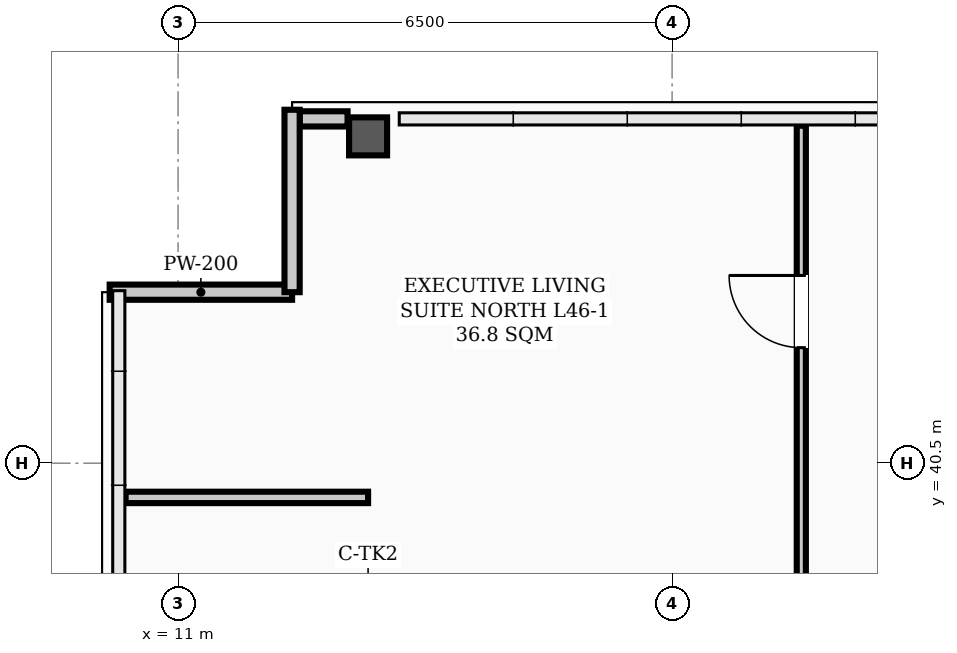
"""IFC4 building model, lengths in metres.
Left out: names, types, materials, properties, quantities, classifications, styles, units other than length and angle.
Written with IfcOpenShell. Run it as: python <this file> out.ifc"""

import sys

from ifc_helpers import new_model, si_unit, direction, frame, frame_2d, origin, origin_2d, place, context, subcontext, project, spatial, rectangle, hollow_rectangle, extrude, element, fill, save


model = new_model("IFC4")
c1 = context("Model", 3, precision=1e-05, world=origin(), true_north=direction((0.0, 1.0)))
c2 = subcontext(c1, "Body", "Model", "MODEL_VIEW")
j1 = project(units=[si_unit("LENGTHUNIT", "METRE"), si_unit("PLANEANGLEUNIT", "RADIAN")], contexts=[c1])
p1 = place(None, origin())
s1 = spatial("IfcSite", under=j1, at=p1, CompositionType="ELEMENT")
p2 = place(p1, origin())
s2 = spatial("IfcBuilding", under=s1, at=p2, CompositionType="ELEMENT")
p3 = place(p2, frame((0.0, 0.0, 185.1)))
s3 = spatial("IfcBuildingStorey", under=s2, at=p3, CompositionType="ELEMENT", Elevation=185.1)
p4 = place(p3, frame((13.5, 44.8, 0.0), z_axis=(0.0, 0.0, 1.0), x_axis=(1.0, 0.0, 0.0)))
e1 = element("IfcColumn", 1, at=p4, inside=s3, PredefinedType="COLUMN", context=c2, shape_type="SweptSolid", body=[
    extrude(hollow_rectangle(XDim=0.5, YDim=0.5, WallThickness=0.024, InnerFilletRadius=0.012, OuterFilletRadius=0.036, at=origin_2d()), origin(), (0.0, 0.0, 1.0), 3.9),
])
p5 = place(p3, frame((12.6, 45.03, 0.0), z_axis=(0.0, 0.0, 1.0), x_axis=(1.0, 0.0, 0.0)))
e2 = element("IfcWall", 2, at=p5, inside=s3, PredefinedType="PARAPET", context=c2, shape_type="SweptSolid", body=[
    extrude(rectangle(XDim=0.63, YDim=0.2, at=frame_2d((0.315, 0.0))), origin(), (0.0, 0.0, 1.0), 1.2),
])
for number, where, z_axis, x_axis in (
    (3, (10.1, 42.75, 0.0), (0.0, 0.0, 1.0), (1.0, 0.0, 0.0)),
    (4, (12.5, 42.75, 0.0), (0.0, 0.0, 1.0), (0.0, 1.0, 0.0)),
):
    element("IfcWall", number, at=place(p3, frame(where, z_axis=z_axis, x_axis=x_axis)), inside=s3, PredefinedType="PARAPET", context=c2, shape_type="SweptSolid", body=[
        extrude(rectangle(XDim=2.4, YDim=0.2, at=frame_2d((1.2, 0.0))), origin(), (0.0, 0.0, 1.0), 1.2),
    ])
p6 = place(p3, frame((10.31, 40.05, 0.0), z_axis=(0.0, 0.0, 1.0), x_axis=(1.0, 0.0, 0.0)))
e5 = element("IfcWall", 5, at=p6, inside=s3, PredefinedType="PARTITIONING", context=c2, shape_type="SweptSolid", body=[
    extrude(rectangle(XDim=3.19, YDim=0.15, at=frame_2d((1.595, 0.0))), origin(), (0.0, 0.0, 1.0), 3.2),
])
p7 = place(p3, frame((19.2, 38.535, 0.0), z_axis=(0.0, 0.0, 1.0), x_axis=(0.0, 1.0, 0.0)))
e6 = element("IfcWall", 6, at=p7, inside=s3, PredefinedType="PARTITIONING", context=c2, shape_type="SweptSolid", body=[
    extrude(rectangle(XDim=6.405, YDim=0.12, at=frame_2d((3.203, 0.0))), origin(), (0.0, 0.0, 1.0), 3.212),
])
p8 = place(p7, frame((3.485, 0.0, 0.0)))
e7 = element("IfcOpeningElement", 7, at=p8, cuts=e6, PredefinedType="OPENING", context=c2, shape_type="SweptSolid", body=[
    extrude(rectangle(XDim=0.95, YDim=2.08, at=frame_2d((0.475, 1.04))), frame((0.0, 0.07, 0.0), z_axis=(0.0, -1.0, 0.0), x_axis=(1.0, 0.0, 0.0)), (0.0, 0.0, 1.0), 0.14),
])
p9 = place(p8, origin())
e8 = element("IfcDoor", 8, at=p9, inside=s3, OperationType="SINGLE_SWING_RIGHT", PredefinedType="DOOR", context=c2, shape_type="SweptSolid", body=[
    extrude(rectangle(XDim=0.95, YDim=2.08, at=frame_2d((0.475, 1.04))), frame((0.0, 0.025, 0.0), z_axis=(0.0, -1.0, 0.0), x_axis=(1.0, 0.0, 0.0)), (0.0, 0.0, 1.0), 0.05),
])
fill(e7, e8)
save(model, sys.argv[1])
